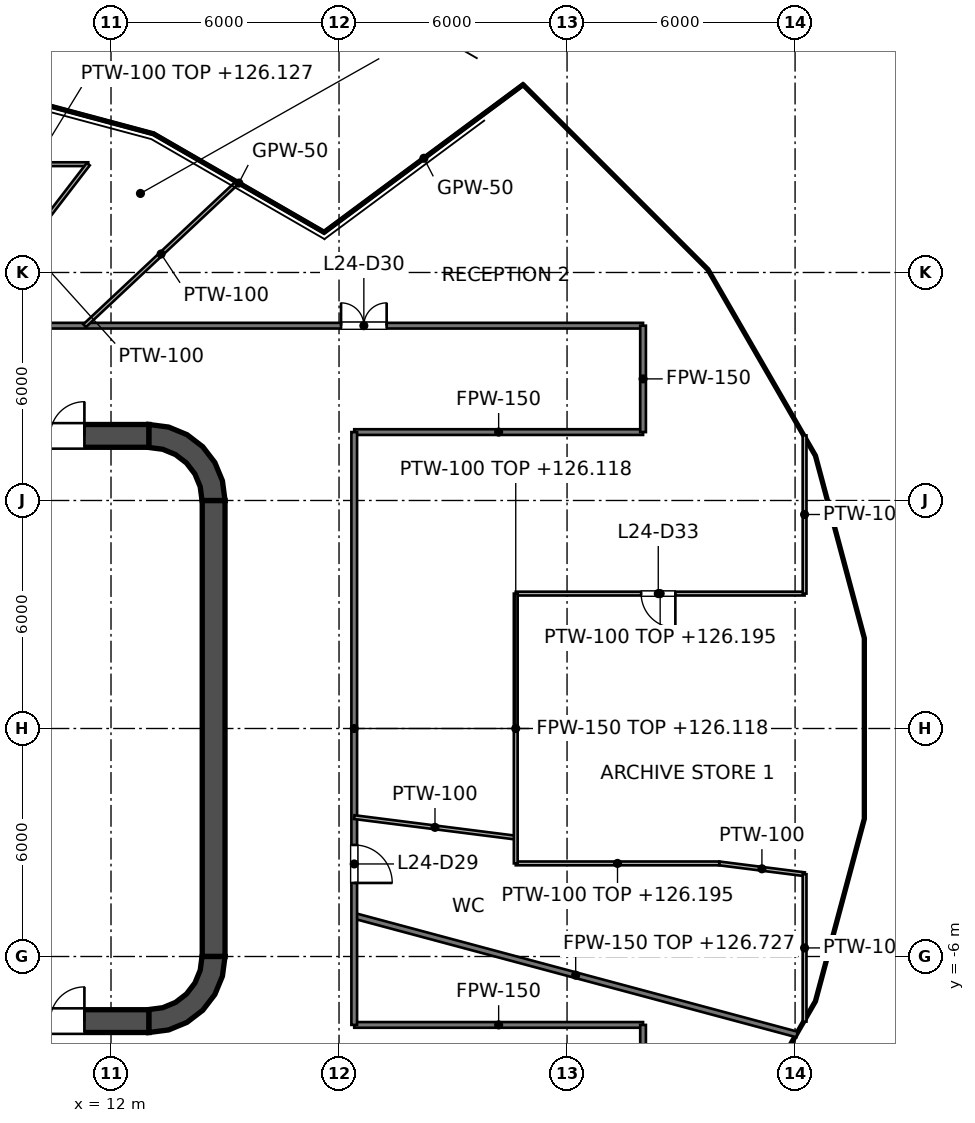
"""IFC4 building model, lengths in metres.
Left out: names, types, materials, properties, quantities, classifications, styles, units other than length and angle.
Written with IfcOpenShell. Run it as: python <this file> out.ifc"""

import sys

from ifc_helpers import new_model, si_unit, direction, frame, frame_2d, origin, place, context, subcontext, project, spatial, polyline, rectangle, outline, extrude, element, fill, save


model = new_model("IFC4")
c1 = context("Model", 3, precision=1e-05, world=origin(), true_north=direction((0.0, 1.0)))
c2 = subcontext(c1, "Body", "Model", "MODEL_VIEW")
j1 = project(units=[si_unit("LENGTHUNIT", "METRE"), si_unit("PLANEANGLEUNIT", "RADIAN")], contexts=[c1])
p1 = place(None, origin())
s1 = spatial("IfcSite", under=j1, at=p1, CompositionType="ELEMENT")
p2 = place(p1, origin())
s2 = spatial("IfcBuilding", under=s1, at=p2, CompositionType="ELEMENT")
p3 = place(p2, frame((0.0, 0.0, 123.0)))
s3 = spatial("IfcBuildingStorey", under=s2, at=p3, CompositionType="ELEMENT", Elevation=123.0)
p4 = place(p3, frame((-13.0, 7.7, 0.0), z_axis=(0.0, 0.0, 1.0), x_axis=(1.0, 0.0, 0.0)))
e1 = element("IfcWall", 1, at=p4, inside=s3, PredefinedType="SHEAR", context=c2, shape_type="SweptSolid", body=[
    extrude(rectangle(XDim=26.0, YDim=0.6, at=frame_2d((13.0, 0.0))), origin(), (0.0, 0.0, 1.0), 4.2),
])
p5 = place(p4, frame((1.7, 0.0, 0.0)))
e2 = element("IfcOpeningElement", 2, at=p5, cuts=e1, PredefinedType="OPENING", context=c2, shape_type="SweptSolid", body=[
    extrude(rectangle(XDim=1.8, YDim=2.1, at=frame_2d((0.9, 1.05))), frame((0.0, 0.3, 0.0), z_axis=(0.0, -1.0, 0.0), x_axis=(1.0, 0.0, 0.0)), (0.0, 0.0, 1.0), 0.6),
])
p6 = place(p4, frame((22.5, 0.0, 0.0)))
e3 = element("IfcOpeningElement", 3, at=p6, cuts=e1, PredefinedType="OPENING", context=c2, shape_type="SweptSolid", body=[
    extrude(rectangle(XDim=1.8, YDim=2.1, at=frame_2d((0.9, 1.05))), frame((0.0, 0.3, 0.0), z_axis=(0.0, -1.0, 0.0), x_axis=(1.0, 0.0, 0.0)), (0.0, 0.0, 1.0), 0.6),
])
p7 = place(p3, frame((-13.0, -7.7, 0.0), z_axis=(0.0, 0.0, 1.0), x_axis=(1.0, 0.0, 0.0)))
e4 = element("IfcWall", 4, at=p7, inside=s3, PredefinedType="SHEAR", context=c2, shape_type="SweptSolid", body=[
    extrude(rectangle(XDim=26.0, YDim=0.6, at=frame_2d((13.0, 0.0))), origin(), (0.0, 0.0, 1.0), 4.2),
])
p8 = place(p7, frame((1.7, 0.0, 0.0)))
e5 = element("IfcOpeningElement", 5, at=p8, cuts=e4, PredefinedType="OPENING", context=c2, shape_type="SweptSolid", body=[
    extrude(rectangle(XDim=1.8, YDim=2.1, at=frame_2d((0.9, 1.05))), frame((0.0, 0.3, 0.0), z_axis=(0.0, -1.0, 0.0), x_axis=(1.0, 0.0, 0.0)), (0.0, 0.0, 1.0), 0.6),
])
p9 = place(p7, frame((22.5, 0.0, 0.0)))
e6 = element("IfcOpeningElement", 6, at=p9, cuts=e4, PredefinedType="OPENING", context=c2, shape_type="SweptSolid", body=[
    extrude(rectangle(XDim=1.8, YDim=2.1, at=frame_2d((0.9, 1.05))), frame((0.0, 0.3, 0.0), z_axis=(0.0, -1.0, 0.0), x_axis=(1.0, 0.0, 0.0)), (0.0, 0.0, 1.0), 0.6),
])
p10 = place(p3, frame((14.7, -6.0, 0.0), z_axis=(0.0, 0.0, 1.0), x_axis=(0.0, 1.0, 0.0)))
e7 = element("IfcWall", 7, at=p10, inside=s3, PredefinedType="SHEAR", context=c2, shape_type="SweptSolid", body=[
    extrude(rectangle(XDim=12.0, YDim=0.6, at=frame_2d((6.0, 0.0))), origin(), (0.0, 0.0, 1.0), 4.2),
])
p11 = place(p3, origin())
e8 = element("IfcWall", 8, at=p11, inside=s3, PredefinedType="SHEAR", context=c2, shape_type="SweptSolid", body=[
    extrude(outline(polyline([(13.0, 8.0), (13.0, 7.395), (13.361, 7.347), (13.698, 7.208), (13.986, 6.986), (14.208, 6.698), (14.347, 6.361), (14.395, 6.0), (15.0, 6.0), (14.932, 6.518), (14.732, 7.0), (14.414, 7.414), (14.0, 7.732), (13.518, 7.932), (13.0, 8.0)])), origin(), (0.0, 0.0, 1.0), 4.2),
])
e9 = element("IfcWall", 9, at=p11, inside=s3, PredefinedType="SHEAR", context=c2, shape_type="SweptSolid", body=[
    extrude(outline(polyline([(15.0, -6.0), (14.395, -6.0), (14.347, -6.361), (14.208, -6.698), (13.986, -6.986), (13.698, -7.208), (13.361, -7.347), (13.0, -7.395), (13.0, -8.0), (13.518, -7.932), (14.0, -7.732), (14.414, -7.414), (14.732, -7.0), (14.932, -6.518), (15.0, -6.0)])), origin(), (0.0, 0.0, 1.0), 4.2),
])
p12 = place(p3, frame((11.8, -7.4, 0.0), z_axis=(0.0, 0.0, 1.0), x_axis=(0.0, 1.0, 0.0)))
e10 = element("IfcWall", 10, at=p12, inside=s3, PredefinedType="SOLIDWALL", context=c2, shape_type="SweptSolid", body=[
    extrude(rectangle(XDim=14.8, YDim=0.4, at=frame_2d((7.4, 0.0))), origin(), (0.0, 0.0, 1.0), 4.05),
])
p13 = place(p12, frame((11.2, 0.0, 0.0)))
e11 = element("IfcOpeningElement", 11, at=p13, cuts=e10, PredefinedType="OPENING", context=c2, shape_type="SweptSolid", body=[
    extrude(rectangle(XDim=1.1, YDim=2.1, at=frame_2d((0.55, 1.05))), frame((0.0, 0.2, 0.0), z_axis=(0.0, -1.0, 0.0), x_axis=(1.0, 0.0, 0.0)), (0.0, 0.0, 1.0), 0.4),
])
p14 = place(p12, frame((8.3, 0.0, 0.0)))
e12 = element("IfcOpeningElement", 12, at=p14, cuts=e10, PredefinedType="OPENING", context=c2, shape_type="SweptSolid", body=[
    extrude(rectangle(XDim=1.1, YDim=2.1, at=frame_2d((0.55, 1.05))), frame((0.0, 0.2, 0.0), z_axis=(0.0, -1.0, 0.0), x_axis=(1.0, 0.0, 0.0)), (0.0, 0.0, 1.0), 0.4),
])
p15 = place(p12, frame((5.4, 0.0, 0.0)))
e13 = element("IfcOpeningElement", 13, at=p15, cuts=e10, PredefinedType="OPENING", context=c2, shape_type="SweptSolid", body=[
    extrude(rectangle(XDim=1.1, YDim=2.1, at=frame_2d((0.55, 1.05))), frame((0.0, 0.2, 0.0), z_axis=(0.0, -1.0, 0.0), x_axis=(1.0, 0.0, 0.0)), (0.0, 0.0, 1.0), 0.4),
])
p16 = place(p12, frame((13.552, 0.0, 0.0)))
e14 = element("IfcOpeningElement", 14, at=p16, cuts=e10, PredefinedType="OPENING", context=c2, shape_type="SweptSolid", body=[
    extrude(rectangle(XDim=0.9, YDim=2.1, at=frame_2d((0.45, 1.05))), frame((0.0, 0.2, 0.0), z_axis=(0.0, -1.0, 0.0), x_axis=(1.0, 0.0, 0.0)), (0.0, 0.0, 1.0), 0.4),
])
p17 = place(p12, frame((0.347, 0.0, 0.0)))
e15 = element("IfcOpeningElement", 15, at=p17, cuts=e10, PredefinedType="OPENING", context=c2, shape_type="SweptSolid", body=[
    extrude(rectangle(XDim=0.9, YDim=2.1, at=frame_2d((0.45, 1.05))), frame((0.0, 0.2, 0.0), z_axis=(0.0, -1.0, 0.0), x_axis=(1.0, 0.0, 0.0)), (0.0, 0.0, 1.0), 0.4),
])
e16 = element("IfcWall", 16, at=p11, inside=s3, PredefinedType="SOLIDWALL", context=c2, shape_type="SweptSolid", body=[
    extrude(outline(polyline([(12.0, -5.675), (12.0, -5.925), (14.15, -5.925), (14.4, -5.925), (14.4, -5.675), (14.4, -3.025), (14.4, -2.775), (14.4, -0.125), (14.4, 0.125), (14.4, 2.775), (14.4, 3.025), (14.4, 5.675), (14.4, 5.925), (14.15, 5.925), (12.0, 5.925), (12.0, 5.675), (14.15, 5.675), (14.15, 3.025), (12.0, 3.025), (12.0, 2.775), (14.15, 2.775), (14.15, 0.125), (12.0, 0.125), (12.0, -0.125), (14.15, -0.125), (14.15, -2.775), (12.0, -2.775), (12.0, -3.025), (14.15, -3.025), (14.15, -5.675), (12.0, -5.675)])), origin(), (0.0, 0.0, 1.0), 4.05),
])
p18 = place(p3, frame((18.4, -4.93, 0.0), z_axis=(0.0, 0.0, 1.0), x_axis=(0.96591851449, -0.258846331567, 0.0)))
e17 = element("IfcWall", 17, at=p18, inside=s3, PredefinedType="PARTITIONING", context=c2, shape_type="SweptSolid", body=[
    extrude(rectangle(XDim=12.065, YDim=0.15, at=frame_2d((6.033, 0.0))), origin(), (0.0, 0.0, 1.0), 3.727),
])
for number, where, z_axis, x_axis in (
    (18, (18.4, -7.8, 0.0), (0.0, 0.0, 1.0), (1.0, 0.0, 0.0)),
    (19, (18.4, 7.8, 0.0), (0.0, 0.0, 1.0), (1.0, 0.0, 0.0)),
):
    element("IfcWall", number, at=place(p3, frame(where, z_axis=z_axis, x_axis=x_axis)), inside=s3, PredefinedType="PARTITIONING", context=c2, shape_type="SweptSolid", body=[
        extrude(rectangle(XDim=7.6, YDim=0.15, at=frame_2d((3.8, 0.0))), origin(), (0.0, 0.0, 1.0), 3.276),
    ])
p19 = place(p3, frame((-26.0, 10.6, 0.0), z_axis=(0.0, 0.0, 1.0), x_axis=(1.0, 0.0, 0.0)))
e20 = element("IfcWall", 20, at=p19, inside=s3, PredefinedType="PARTITIONING", context=c2, shape_type="SweptSolid", body=[
    extrude(rectangle(XDim=52.0, YDim=0.15, at=frame_2d((26.0, 0.0))), origin(), (0.0, 0.0, 1.0), 3.127),
])
p20 = place(p19, frame((44.053, 0.0, 0.0)))
e21 = element("IfcOpeningElement", 21, at=p20, cuts=e20, PredefinedType="OPENING", context=c2, shape_type="SweptSolid", body=[
    extrude(rectangle(XDim=1.2, YDim=2.1, at=frame_2d((0.6, 1.05))), frame((0.0, 0.075, 0.0), z_axis=(0.0, -1.0, 0.0), x_axis=(1.0, 0.0, 0.0)), (0.0, 0.0, 1.0), 0.15),
])
p21 = place(p19, frame((35.168, 0.0, 0.0)))
e22 = element("IfcOpeningElement", 22, at=p21, cuts=e20, PredefinedType="OPENING", context=c2, shape_type="SweptSolid", body=[
    extrude(rectangle(XDim=1.0, YDim=2.1, at=frame_2d((0.5, 1.05))), frame((0.0, 0.075, 0.0), z_axis=(0.0, -1.0, 0.0), x_axis=(1.0, 0.0, 0.0)), (0.0, 0.0, 1.0), 0.15),
])
p22 = place(p19, frame((32.577, 0.0, 0.0)))
e23 = element("IfcOpeningElement", 23, at=p22, cuts=e20, PredefinedType="OPENING", context=c2, shape_type="SweptSolid", body=[
    extrude(rectangle(XDim=1.0, YDim=2.1, at=frame_2d((0.5, 1.05))), frame((0.0, 0.075, 0.0), z_axis=(0.0, -1.0, 0.0), x_axis=(1.0, 0.0, 0.0)), (0.0, 0.0, 1.0), 0.15),
])
p23 = place(p19, frame((28.51, 0.0, 0.0)))
e24 = element("IfcOpeningElement", 24, at=p23, cuts=e20, PredefinedType="OPENING", context=c2, shape_type="SweptSolid", body=[
    extrude(rectangle(XDim=1.0, YDim=2.1, at=frame_2d((0.5, 1.05))), frame((0.0, 0.075, 0.0), z_axis=(0.0, -1.0, 0.0), x_axis=(1.0, 0.0, 0.0)), (0.0, 0.0, 1.0), 0.15),
])
p24 = place(p19, frame((22.49, 0.0, 0.0)))
e25 = element("IfcOpeningElement", 25, at=p24, cuts=e20, PredefinedType="OPENING", context=c2, shape_type="SweptSolid", body=[
    extrude(rectangle(XDim=1.0, YDim=2.1, at=frame_2d((0.5, 1.05))), frame((0.0, 0.075, 0.0), z_axis=(0.0, -1.0, 0.0), x_axis=(1.0, 0.0, 0.0)), (0.0, 0.0, 1.0), 0.15),
])
p25 = place(p19, frame((16.554, 0.0, 0.0)))
e26 = element("IfcOpeningElement", 26, at=p25, cuts=e20, PredefinedType="OPENING", context=c2, shape_type="SweptSolid", body=[
    extrude(rectangle(XDim=1.0, YDim=2.1, at=frame_2d((0.5, 1.05))), frame((0.0, 0.075, 0.0), z_axis=(0.0, -1.0, 0.0), x_axis=(1.0, 0.0, 0.0)), (0.0, 0.0, 1.0), 0.15),
])
p26 = place(p19, frame((6.614, 0.0, 0.0)))
e27 = element("IfcOpeningElement", 27, at=p26, cuts=e20, PredefinedType="OPENING", context=c2, shape_type="SweptSolid", body=[
    extrude(rectangle(XDim=1.0, YDim=2.1, at=frame_2d((0.5, 1.05))), frame((0.0, 0.075, 0.0), z_axis=(0.0, -1.0, 0.0), x_axis=(1.0, 0.0, 0.0)), (0.0, 0.0, 1.0), 0.15),
])
for number, where, z_axis, x_axis in (
    (28, (26.0, -10.6, 0.0), (0.0, 0.0, 1.0), (0.0, 1.0, 0.0)),
    (29, (26.0, 7.8, 0.0), (0.0, 0.0, 1.0), (0.0, 1.0, 0.0)),
):
    element("IfcWall", number, at=place(p3, frame(where, z_axis=z_axis, x_axis=x_axis)), inside=s3, PredefinedType="PARTITIONING", context=c2, shape_type="SweptSolid", body=[
        extrude(rectangle(XDim=2.8, YDim=0.15, at=frame_2d((1.4, 0.0))), origin(), (0.0, 0.0, 1.0), 3.276),
    ])
p27 = place(p3, frame((18.4, -7.8, 0.0), z_axis=(0.0, 0.0, 1.0), x_axis=(0.0, 1.0, 0.0)))
e30 = element("IfcWall", 30, at=p27, inside=s3, PredefinedType="PARTITIONING", context=c2, shape_type="SweptSolid", body=[
    extrude(rectangle(XDim=15.6, YDim=0.15, at=frame_2d((7.8, 0.0))), origin(), (0.0, 0.0, 1.0), 3.118),
])
p28 = place(p27, frame((3.735, 0.0, 0.0)))
e31 = element("IfcOpeningElement", 31, at=p28, cuts=e30, PredefinedType="OPENING", context=c2, shape_type="SweptSolid", body=[
    extrude(rectangle(XDim=1.0, YDim=2.1, at=frame_2d((0.5, 1.05))), frame((0.0, 0.075, 0.0), z_axis=(0.0, -1.0, 0.0), x_axis=(1.0, 0.0, 0.0)), (0.0, 0.0, 1.0), 0.15),
])
p29 = place(p3, frame((13.119, 15.649, 0.0), z_axis=(0.0, 0.0, 1.0), x_axis=(0.866054574236, -0.499949471892, 0.0)))
e32 = element("IfcWall", 32, at=p29, inside=s3, PredefinedType="PARTITIONING", context=c2, shape_type="SweptSolid", body=[
    extrude(rectangle(XDim=5.182, YDim=0.05, at=frame_2d((2.591, 0.0))), origin(), (0.0, 0.0, 1.0), 3.127),
])
p30 = place(p3, frame((4.724, 17.899, 0.0), z_axis=(0.0, 0.0, 1.0), x_axis=(0.965907796442, -0.258886324037, 0.0)))
e33 = element("IfcWall", 33, at=p30, inside=s3, PredefinedType="PARTITIONING", context=c2, shape_type="SweptSolid", body=[
    extrude(rectangle(XDim=8.691, YDim=0.05, at=frame_2d((4.346, 0.0))), origin(), (0.0, 0.0, 1.0), 3.127),
])
p31 = place(p3, frame((17.607, 13.058, 0.0), z_axis=(0.0, 0.0, 1.0), x_axis=(0.803142977869, 0.595786335107, 0.0)))
e34 = element("IfcWall", 34, at=p31, inside=s3, PredefinedType="PARTITIONING", context=c2, shape_type="SweptSolid", body=[
    extrude(rectangle(XDim=6.539, YDim=0.05, at=frame_2d((3.27, 0.0))), origin(), (0.0, 0.0, 1.0), 3.127),
])
p32 = place(p3, frame((18.4, -2.332, 0.0), z_axis=(0.0, 0.0, 1.0), x_axis=(0.992044690644, -0.125886185756, 0.0)))
e35 = element("IfcWall", 35, at=p32, inside=s3, PredefinedType="PARTITIONING", context=c2, shape_type="SweptSolid", body=[
    extrude(rectangle(XDim=4.284, YDim=0.1, at=frame_2d((2.142, 0.0))), origin(), (0.0, 0.0, 1.0), 4.05),
])
p33 = place(p3, frame((28.005, -3.55, 0.0), z_axis=(0.0, 0.0, 1.0), x_axis=(0.992043783592, -0.125893333564, 0.0)))
e36 = element("IfcWall", 36, at=p33, inside=s3, PredefinedType="PARTITIONING", context=c2, shape_type="SweptSolid", body=[
    extrude(rectangle(XDim=2.263, YDim=0.1, at=frame_2d((1.132, 0.0))), origin(), (0.0, 0.0, 1.0), 4.05),
])
p34 = place(p3, frame((22.65, -3.55, 0.0), z_axis=(0.0, 0.0, 1.0), x_axis=(1.0, 0.0, 0.0)))
e37 = element("IfcWall", 37, at=p34, inside=s3, PredefinedType="PARTITIONING", context=c2, shape_type="SweptSolid", body=[
    extrude(rectangle(XDim=5.355, YDim=0.1, at=frame_2d((2.677, 0.0))), origin(), (0.0, 0.0, 1.0), 3.195),
])
p35 = place(p3, frame((22.65, 3.55, 0.0), z_axis=(0.0, 0.0, 1.0), x_axis=(1.0, 0.0, 0.0)))
e38 = element("IfcWall", 38, at=p35, inside=s3, PredefinedType="PARTITIONING", context=c2, shape_type="SweptSolid", body=[
    extrude(rectangle(XDim=7.6, YDim=0.1, at=frame_2d((3.8, 0.0))), origin(), (0.0, 0.0, 1.0), 3.195),
])
p36 = place(p35, frame((3.3, 0.0, 0.0)))
e39 = element("IfcOpeningElement", 39, at=p36, cuts=e38, PredefinedType="OPENING", context=c2, shape_type="SweptSolid", body=[
    extrude(rectangle(XDim=0.9, YDim=2.1, at=frame_2d((0.45, 1.05))), frame((0.0, 0.05, 0.0), z_axis=(0.0, -1.0, 0.0), x_axis=(1.0, 0.0, 0.0)), (0.0, 0.0, 1.0), 0.1),
])
p37 = place(p3, frame((8.573, 14.85, 0.0), z_axis=(0.0, 0.0, 1.0), x_axis=(1.0, 0.0, 0.0)))
e40 = element("IfcWall", 40, at=p37, inside=s3, PredefinedType="PARTITIONING", context=c2, shape_type="SweptSolid", body=[
    extrude(rectangle(XDim=2.828, YDim=0.1, at=frame_2d((1.414, 0.0))), origin(), (0.0, 0.0, 1.0), 3.127),
])
p38 = place(p3, frame((11.306, 10.6, 0.0), z_axis=(0.0, 0.0, 1.0), x_axis=(0.72951097982, 0.683969100415, 0.0)))
e41 = element("IfcWall", 41, at=p38, inside=s3, PredefinedType="PARTITIONING", context=c2, shape_type="SweptSolid", body=[
    extrude(rectangle(XDim=5.516, YDim=0.1, at=frame_2d((2.758, 0.0))), origin(), (0.0, 0.0, 1.0), 4.05),
])
p39 = place(p3, frame((8.138, 10.6, 0.0), z_axis=(0.0, 0.0, 1.0), x_axis=(0.608972822202, 0.793191087834, 0.0)))
e42 = element("IfcWall", 42, at=p39, inside=s3, PredefinedType="PARTITIONING", context=c2, shape_type="SweptSolid", body=[
    extrude(rectangle(XDim=5.358, YDim=0.1, at=frame_2d((2.679, 0.0))), origin(), (0.0, 0.0, 1.0), 4.05),
])
p40 = place(p3, frame((30.25, -7.713, 0.0), z_axis=(0.0, 0.0, 1.0), x_axis=(0.0, 1.0, 0.0)))
e43 = element("IfcWall", 43, at=p40, inside=s3, PredefinedType="PARTITIONING", context=c2, shape_type="SweptSolid", body=[
    extrude(rectangle(XDim=3.878, YDim=0.1, at=frame_2d((1.939, 0.0))), origin(), (0.0, 0.0, 1.0), 3.127),
])
p41 = place(p3, frame((30.25, 3.55, 0.0), z_axis=(0.0, 0.0, 1.0), x_axis=(0.0, 1.0, 0.0)))
e44 = element("IfcWall", 44, at=p41, inside=s3, PredefinedType="PARTITIONING", context=c2, shape_type="SweptSolid", body=[
    extrude(rectangle(XDim=4.163, YDim=0.1, at=frame_2d((2.082, 0.0))), origin(), (0.0, 0.0, 1.0), 3.127),
])
p42 = place(p3, frame((22.65, -3.55, 0.0), z_axis=(0.0, 0.0, 1.0), x_axis=(0.0, 1.0, 0.0)))
e45 = element("IfcWall", 45, at=p42, inside=s3, PredefinedType="PARTITIONING", context=c2, shape_type="SweptSolid", body=[
    extrude(rectangle(XDim=7.1, YDim=0.1, at=frame_2d((3.55, 0.0))), origin(), (0.0, 0.0, 1.0), 3.118),
])
p43 = place(p13, origin())
e46 = element("IfcDoor", 46, at=p43, inside=s3, OperationType="DOUBLE_DOOR_SLIDING", PredefinedType="DOOR", context=c2, shape_type="SweptSolid", body=[
    extrude(rectangle(XDim=1.1, YDim=2.1, at=frame_2d((0.55, 1.05))), frame((0.0, 0.025, 0.0), z_axis=(0.0, -1.0, 0.0), x_axis=(1.0, 0.0, 0.0)), (0.0, 0.0, 1.0), 0.05),
])
fill(e11, e46)
p44 = place(p14, origin())
e47 = element("IfcDoor", 47, at=p44, inside=s3, OperationType="DOUBLE_DOOR_SLIDING", PredefinedType="DOOR", context=c2, shape_type="SweptSolid", body=[
    extrude(rectangle(XDim=1.1, YDim=2.1, at=frame_2d((0.55, 1.05))), frame((0.0, 0.025, 0.0), z_axis=(0.0, -1.0, 0.0), x_axis=(1.0, 0.0, 0.0)), (0.0, 0.0, 1.0), 0.05),
])
fill(e12, e47)
p45 = place(p15, origin())
e48 = element("IfcDoor", 48, at=p45, inside=s3, OperationType="DOUBLE_DOOR_SLIDING", PredefinedType="DOOR", context=c2, shape_type="SweptSolid", body=[
    extrude(rectangle(XDim=1.1, YDim=2.1, at=frame_2d((0.55, 1.05))), frame((0.0, 0.025, 0.0), z_axis=(0.0, -1.0, 0.0), x_axis=(1.0, 0.0, 0.0)), (0.0, 0.0, 1.0), 0.05),
])
fill(e13, e48)
p46 = place(p16, origin())
e49 = element("IfcDoor", 49, at=p46, inside=s3, OperationType="SINGLE_SWING_RIGHT", PredefinedType="DOOR", context=c2, shape_type="SweptSolid", body=[
    extrude(rectangle(XDim=0.9, YDim=2.1, at=frame_2d((0.45, 1.05))), frame((0.0, 0.025, 0.0), z_axis=(0.0, -1.0, 0.0), x_axis=(1.0, 0.0, 0.0)), (0.0, 0.0, 1.0), 0.05),
])
fill(e14, e49)
p47 = place(p17, origin())
e50 = element("IfcDoor", 50, at=p47, inside=s3, OperationType="SINGLE_SWING_RIGHT", PredefinedType="DOOR", context=c2, shape_type="SweptSolid", body=[
    extrude(rectangle(XDim=0.9, YDim=2.1, at=frame_2d((0.45, 1.05))), frame((0.0, 0.025, 0.0), z_axis=(0.0, -1.0, 0.0), x_axis=(1.0, 0.0, 0.0)), (0.0, 0.0, 1.0), 0.05),
])
fill(e15, e50)
p48 = place(p6, origin())
e51 = element("IfcDoor", 51, at=p48, inside=s3, OperationType="DOUBLE_DOOR_SINGLE_SWING", PredefinedType="DOOR", context=c2, shape_type="SweptSolid", body=[
    extrude(rectangle(XDim=1.8, YDim=2.1, at=frame_2d((0.9, 1.05))), frame((0.0, 0.025, 0.0), z_axis=(0.0, -1.0, 0.0), x_axis=(1.0, 0.0, 0.0)), (0.0, 0.0, 1.0), 0.05),
])
fill(e3, e51)
p49 = place(p9, origin())
e52 = element("IfcDoor", 52, at=p49, inside=s3, OperationType="DOUBLE_DOOR_SINGLE_SWING", PredefinedType="DOOR", context=c2, shape_type="SweptSolid", body=[
    extrude(rectangle(XDim=1.8, YDim=2.1, at=frame_2d((0.9, 1.05))), frame((0.0, 0.025, 0.0), z_axis=(0.0, -1.0, 0.0), x_axis=(1.0, 0.0, 0.0)), (0.0, 0.0, 1.0), 0.05),
])
fill(e6, e52)
p50 = place(p28, origin())
e53 = element("IfcDoor", 53, at=p50, inside=s3, OperationType="SINGLE_SWING_LEFT", PredefinedType="DOOR", context=c2, shape_type="SweptSolid", body=[
    extrude(rectangle(XDim=1.0, YDim=2.1, at=frame_2d((0.5, 1.05))), frame((0.0, 0.025, 0.0), z_axis=(0.0, -1.0, 0.0), x_axis=(1.0, 0.0, 0.0)), (0.0, 0.0, 1.0), 0.05),
])
fill(e31, e53)
p51 = place(p20, origin())
e54 = element("IfcDoor", 54, at=p51, inside=s3, OperationType="DOUBLE_DOOR_SINGLE_SWING", PredefinedType="DOOR", context=c2, shape_type="SweptSolid", body=[
    extrude(rectangle(XDim=1.2, YDim=2.1, at=frame_2d((0.6, 1.05))), frame((0.0, 0.025, 0.0), z_axis=(0.0, -1.0, 0.0), x_axis=(1.0, 0.0, 0.0)), (0.0, 0.0, 1.0), 0.05),
])
fill(e21, e54)
p52 = place(p36, origin())
e55 = element("IfcDoor", 55, at=p52, inside=s3, OperationType="SINGLE_SWING_RIGHT", PredefinedType="DOOR", context=c2, shape_type="SweptSolid", body=[
    extrude(rectangle(XDim=0.9, YDim=2.1, at=frame_2d((0.45, 1.05))), frame((0.0, 0.025, 0.0), z_axis=(0.0, -1.0, 0.0), x_axis=(1.0, 0.0, 0.0)), (0.0, 0.0, 1.0), 0.05),
])
fill(e39, e55)
save(model, sys.argv[1])
